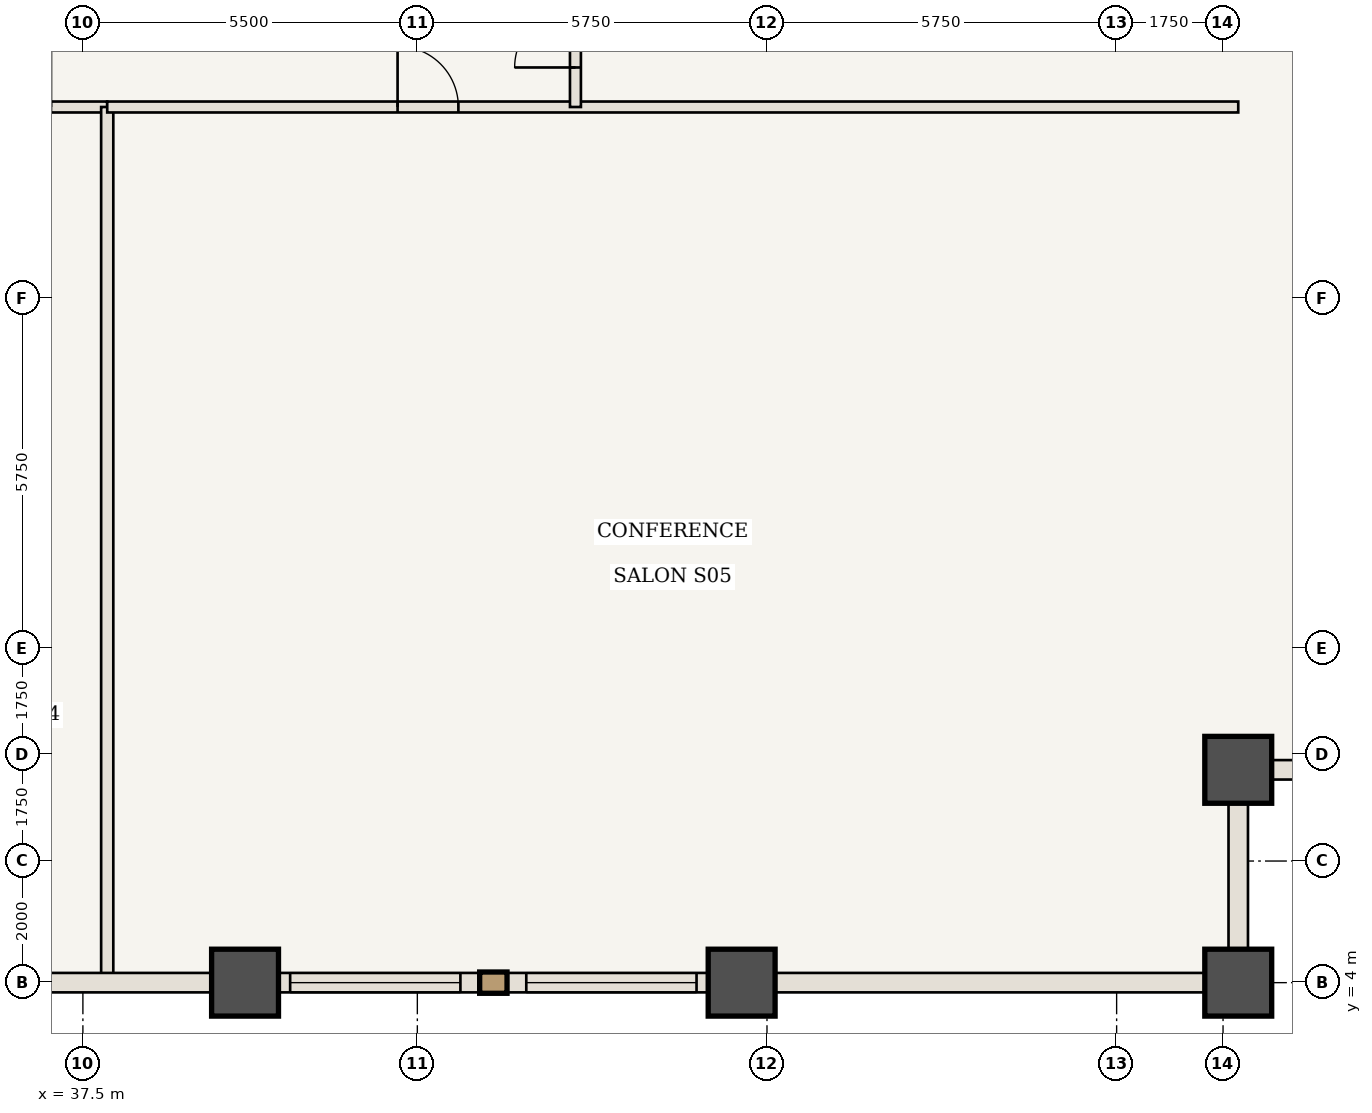
"""IFC4 building model, lengths in metres.
Left out: names, types, materials, properties, quantities, classifications, styles, units other than length and angle.
Written with IfcOpenShell. Run it as: python <this file> out.ifc"""

import sys

from ifc_helpers import new_model, si_unit, direction, frame, frame_2d, origin, origin_2d, place, context, subcontext, project, spatial, rectangle, extrude, element, fill, save


model = new_model("IFC4")
c1 = context("Model", 3, precision=1e-05, world=origin(), true_north=direction((0.0, 1.0)))
c2 = subcontext(c1, "Body", "Model", "MODEL_VIEW")
j1 = project(units=[si_unit("LENGTHUNIT", "METRE"), si_unit("PLANEANGLEUNIT", "RADIAN")], contexts=[c1])
p1 = place(None, origin())
s1 = spatial("IfcSite", under=j1, at=p1, CompositionType="ELEMENT")
p2 = place(p1, origin())
s2 = spatial("IfcBuilding", under=s1, at=p2, CompositionType="ELEMENT")
p3 = place(p2, frame((0.0, 0.0, 42.35)))
s3 = spatial("IfcBuildingStorey", under=s2, at=p3, CompositionType="ELEMENT", Elevation=42.35)
for number, where, z_axis, x_axis in (
    (1, (56.5, 4.0, 0.0), (0.0, 0.0, 1.0), (1.0, 0.0, 0.0)),
    (2, (56.5, 7.5, 0.0), (0.0, 0.0, 1.0), (1.0, 0.0, 0.0)),
    (3, (40.167, 4.0, 0.0), (0.0, 0.0, 1.0), (1.0, 0.0, 0.0)),
    (4, (48.333, 4.0, 0.0), (0.0, 0.0, 1.0), (1.0, 0.0, 0.0)),
):
    element("IfcColumn", number, at=place(p3, frame(where, z_axis=z_axis, x_axis=x_axis)), inside=s3, PredefinedType="COLUMN", context=c2, shape_type="SweptSolid", body=[
        extrude(rectangle(XDim=1.1, YDim=1.1, at=origin_2d()), origin(), (0.0, 0.0, 1.0), 3.5),
    ])
p4 = place(p3, frame((33.2, 18.4, 0.0), z_axis=(0.0, 0.0, 1.0), x_axis=(1.0, 0.0, 0.0)))
e5 = element("IfcWall", 5, at=p4, inside=s3, PredefinedType="STANDARD", context=c2, shape_type="SweptSolid", body=[
    extrude(rectangle(XDim=4.7, YDim=0.18, at=frame_2d((2.35, 0.0))), origin(), (0.0, 0.0, 1.0), 3.32),
])
p5 = place(p4, frame((2.775, 0.0, 0.0)))
e6 = element("IfcOpeningElement", 6, at=p5, cuts=e5, PredefinedType="OPENING", context=c2, shape_type="SweptSolid", body=[
    extrude(rectangle(XDim=1.0, YDim=2.15, at=frame_2d((0.5, 1.075))), frame((0.0, 0.1, 0.0), z_axis=(0.0, -1.0, 0.0), x_axis=(1.0, 0.0, 0.0)), (0.0, 0.0, 1.0), 0.2),
])
p6 = place(p3, frame((37.9, 4.06, 0.0), z_axis=(0.0, 0.0, 1.0), x_axis=(0.0, 1.0, 0.0)))
e7 = element("IfcWall", 7, at=p6, inside=s3, PredefinedType="STANDARD", context=c2, shape_type="SweptSolid", body=[
    extrude(rectangle(XDim=14.34, YDim=0.2, at=frame_2d((7.17, 0.0))), origin(), (0.0, 0.0, 1.0), 3.32),
])
p7 = place(p3, frame((37.9, 18.4, 0.0), z_axis=(0.0, 0.0, 1.0), x_axis=(1.0, 0.0, 0.0)))
e8 = element("IfcWall", 8, at=p7, inside=s3, PredefinedType="STANDARD", context=c2, shape_type="SweptSolid", body=[
    extrude(rectangle(XDim=18.6, YDim=0.18, at=frame_2d((9.3, 0.0))), origin(), (0.0, 0.0, 1.0), 3.32),
])
p8 = place(p7, frame((4.775, 0.0, 0.0)))
e9 = element("IfcOpeningElement", 9, at=p8, cuts=e8, PredefinedType="OPENING", context=c2, shape_type="SweptSolid", body=[
    extrude(rectangle(XDim=1.0, YDim=2.15, at=frame_2d((0.5, 1.075))), frame((0.0, 0.1, 0.0), z_axis=(0.0, -1.0, 0.0), x_axis=(1.0, 0.0, 0.0)), (0.0, 0.0, 1.0), 0.2),
])
p9 = place(p3, frame((45.6, 18.4, 0.0), z_axis=(0.0, 0.0, 1.0), x_axis=(0.0, 1.0, 0.0)))
e10 = element("IfcWall", 10, at=p9, inside=s3, PredefinedType="STANDARD", context=c2, shape_type="SweptSolid", body=[
    extrude(rectangle(XDim=5.2, YDim=0.18, at=frame_2d((2.6, 0.0))), origin(), (0.0, 0.0, 1.0), 3.32),
])
p10 = place(p9, frame((0.65, 0.0, 0.0)))
e11 = element("IfcOpeningElement", 11, at=p10, cuts=e10, PredefinedType="OPENING", context=c2, shape_type="SweptSolid", body=[
    extrude(rectangle(XDim=1.0, YDim=2.15, at=frame_2d((0.5, 1.075))), frame((0.0, 0.1, 0.0), z_axis=(0.0, -1.0, 0.0), x_axis=(1.0, 0.0, 0.0)), (0.0, 0.0, 1.0), 0.2),
])
p11 = place(p3, frame((40.167, 4.0, 0.0), z_axis=(0.0, 0.0, 1.0), x_axis=(-1.0, 0.0, 0.0)))
e12 = element("IfcWall", 12, at=p11, inside=s3, PredefinedType="USERDEFINED", context=c2, shape_type="SweptSolid", body=[
    extrude(rectangle(XDim=8.167, YDim=0.32, at=frame_2d((4.083, 0.0))), origin(), (0.0, 0.0, 1.0), 2.52),
])
p12 = place(p11, frame((3.417, 0.0, 0.85)))
e13 = element("IfcOpeningElement", 13, at=p12, cuts=e12, PredefinedType="OPENING", context=c2, shape_type="SweptSolid", body=[
    extrude(rectangle(XDim=2.4, YDim=1.47, at=frame_2d((1.2, 0.735))), frame((0.0, 0.17, 0.0), z_axis=(0.0, -1.0, 0.0), x_axis=(1.0, 0.0, 0.0)), (0.0, 0.0, 1.0), 0.34),
])
p13 = place(p3, frame((48.333, 4.0, 0.0), z_axis=(0.0, 0.0, 1.0), x_axis=(-1.0, 0.0, 0.0)))
e14 = element("IfcWall", 14, at=p13, inside=s3, PredefinedType="USERDEFINED", context=c2, shape_type="SweptSolid", body=[
    extrude(rectangle(XDim=8.167, YDim=0.32, at=frame_2d((4.083, 0.0))), origin(), (0.0, 0.0, 1.0), 2.52),
])
p14 = place(p13, frame((0.742, 0.0, 0.85)))
e15 = element("IfcOpeningElement", 15, at=p14, cuts=e14, PredefinedType="OPENING", context=c2, shape_type="SweptSolid", body=[
    extrude(rectangle(XDim=2.8, YDim=1.47, at=frame_2d((1.4, 0.735))), frame((0.0, 0.17, 0.0), z_axis=(0.0, -1.0, 0.0), x_axis=(1.0, 0.0, 0.0)), (0.0, 0.0, 1.0), 0.34),
])
p15 = place(p13, frame((4.625, 0.0, 0.85)))
e16 = element("IfcOpeningElement", 16, at=p15, cuts=e14, PredefinedType="OPENING", context=c2, shape_type="SweptSolid", body=[
    extrude(rectangle(XDim=2.8, YDim=1.47, at=frame_2d((1.4, 0.735))), frame((0.0, 0.17, 0.0), z_axis=(0.0, -1.0, 0.0), x_axis=(1.0, 0.0, 0.0)), (0.0, 0.0, 1.0), 0.34),
])
p16 = place(p3, frame((56.5, 4.0, 0.0), z_axis=(0.0, 0.0, 1.0), x_axis=(-1.0, 0.0, 0.0)))
e17 = element("IfcWall", 17, at=p16, inside=s3, PredefinedType="USERDEFINED", context=c2, shape_type="SweptSolid", body=[
    extrude(rectangle(XDim=8.167, YDim=0.32, at=frame_2d((4.083, 0.0))), origin(), (0.0, 0.0, 1.0), 2.52),
])
for number, where, z_axis, x_axis in (
    (18, (56.5, 7.5, 0.0), (0.0, 0.0, 1.0), (0.0, -1.0, 0.0)),
    (19, (60.0, 7.5, 0.0), (0.0, 0.0, 1.0), (-1.0, 0.0, 0.0)),
):
    element("IfcWall", number, at=place(p3, frame(where, z_axis=z_axis, x_axis=x_axis)), inside=s3, PredefinedType="USERDEFINED", context=c2, shape_type="SweptSolid", body=[
        extrude(rectangle(XDim=3.5, YDim=0.32, at=frame_2d((1.75, 0.0))), origin(), (0.0, 0.0, 1.0), 2.52),
    ])
p17 = place(p8, origin())
e20 = element("IfcDoor", 20, at=p17, inside=s3, OperationType="SINGLE_SWING_LEFT", PredefinedType="DOOR", context=c2, shape_type="SweptSolid", body=[
    extrude(rectangle(XDim=1.0, YDim=2.15, at=frame_2d((0.5, 1.075))), frame((0.0, 0.025, 0.0), z_axis=(0.0, -1.0, 0.0), x_axis=(1.0, 0.0, 0.0)), (0.0, 0.0, 1.0), 0.05),
])
fill(e9, e20)
p18 = place(p10, origin())
e21 = element("IfcDoor", 21, at=p18, inside=s3, OperationType="SINGLE_SWING_LEFT", PredefinedType="DOOR", context=c2, shape_type="SweptSolid", body=[
    extrude(rectangle(XDim=1.0, YDim=2.15, at=frame_2d((0.5, 1.075))), frame((0.0, 0.025, 0.0), z_axis=(0.0, -1.0, 0.0), x_axis=(1.0, 0.0, 0.0)), (0.0, 0.0, 1.0), 0.05),
])
fill(e11, e21)
p19 = place(p14, origin())
e22 = element("IfcWindow", 22, at=p19, inside=s3, PartitioningType="SINGLE_PANEL", PredefinedType="WINDOW", context=c2, shape_type="SweptSolid", body=[
    extrude(rectangle(XDim=2.8, YDim=1.47, at=frame_2d((1.4, 0.735))), frame((0.0, 0.03, 0.0), z_axis=(0.0, -1.0, 0.0), x_axis=(1.0, 0.0, 0.0)), (0.0, 0.0, 1.0), 0.06),
])
fill(e15, e22)
p20 = place(p15, origin())
e23 = element("IfcWindow", 23, at=p20, inside=s3, PartitioningType="SINGLE_PANEL", PredefinedType="WINDOW", context=c2, shape_type="SweptSolid", body=[
    extrude(rectangle(XDim=2.8, YDim=1.47, at=frame_2d((1.4, 0.735))), frame((0.0, 0.03, 0.0), z_axis=(0.0, -1.0, 0.0), x_axis=(1.0, 0.0, 0.0)), (0.0, 0.0, 1.0), 0.06),
])
fill(e16, e23)
save(model, sys.argv[1])
